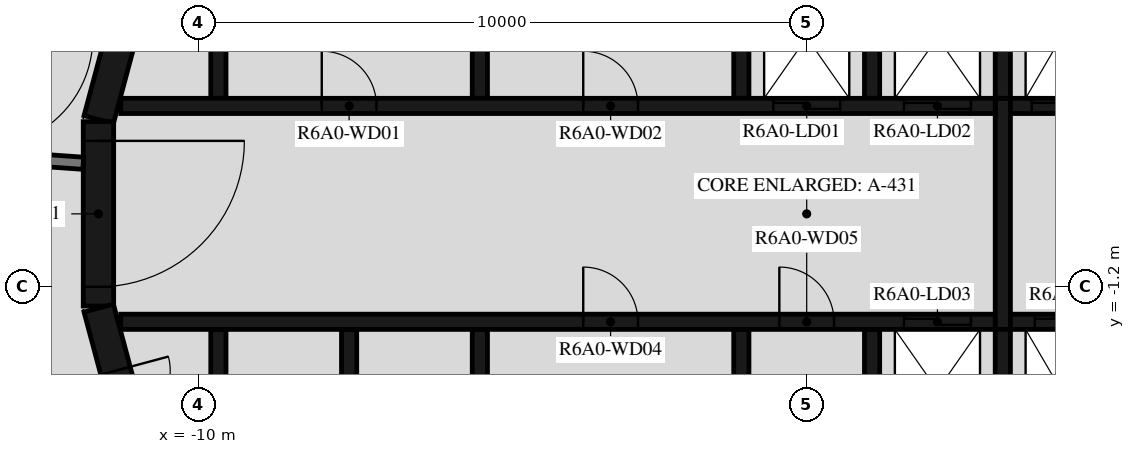
"""IFC4 building model, lengths in metres.
Left out: names, types, materials, properties, quantities, classifications, styles, units other than length and angle.
Written with IfcOpenShell. Run it as: python <this file> out.ifc"""

import sys

from ifc_helpers import new_model, si_unit, direction, frame, frame_2d, origin, place, context, subcontext, project, spatial, polyline, rectangle, outline, extrude, element, fill, save


model = new_model("IFC4")
c1 = context("Model", 3, precision=1e-05, world=origin(), true_north=direction((0.0, 1.0)))
c2 = subcontext(c1, "Body", "Model", "MODEL_VIEW")
j1 = project(units=[si_unit("LENGTHUNIT", "METRE"), si_unit("PLANEANGLEUNIT", "RADIAN")], contexts=[c1])
p1 = place(None, origin())
s1 = spatial("IfcSite", under=j1, at=p1, CompositionType="ELEMENT")
p2 = place(p1, origin())
s2 = spatial("IfcBuilding", under=s1, at=p2, CompositionType="ELEMENT")
p3 = place(p2, frame((0.0, 0.0, 226.7)))
s3 = spatial("IfcBuildingStorey", under=s2, at=p3, CompositionType="ELEMENT", Elevation=226.7)
p4 = place(p3, frame((-10.858, 4.479, 0.0), z_axis=(0.0, 0.0, 1.0), x_axis=(-0.258734743916, -0.965948410781, 0.0)))
e1 = element("IfcWall", 1, at=p4, inside=s3, PredefinedType="SHEAR", context=c2, shape_type="SweptSolid", body=[
    extrude(rectangle(XDim=3.033, YDim=0.5, at=frame_2d((1.516, 0.0))), origin(), (0.0, 0.0, 1.0), 3.12),
])
p5 = place(p3, frame((-11.647, 1.516, 0.0), z_axis=(0.0, 0.0, 1.0), x_axis=(0.0, -1.0, 0.0)))
e2 = element("IfcWall", 2, at=p5, inside=s3, PredefinedType="SHEAR", context=c2, shape_type="SweptSolid", body=[
    extrude(rectangle(XDim=3.033, YDim=0.5, at=frame_2d((1.516, 0.0))), origin(), (0.0, 0.0, 1.0), 3.12),
])
p6 = place(p5, frame((0.316, 0.0, 0.0)))
e3 = element("IfcOpeningElement", 3, at=p6, cuts=e2, PredefinedType="OPENING", context=c2, shape_type="SweptSolid", body=[
    extrude(rectangle(XDim=2.4, YDim=2.1, at=frame_2d((1.2, 1.05))), frame((0.0, 0.26, 0.0), z_axis=(0.0, -1.0, 0.0), x_axis=(1.0, 0.0, 0.0)), (0.0, 0.0, 1.0), 0.52),
])
p7 = place(p3, frame((-11.643, -1.55, 0.0), z_axis=(0.0, 0.0, 1.0), x_axis=(0.258734743916, -0.965948410781, 0.0)))
e4 = element("IfcWall", 4, at=p7, inside=s3, PredefinedType="SHEAR", context=c2, shape_type="SweptSolid", body=[
    extrude(rectangle(XDim=3.033, YDim=0.5, at=frame_2d((1.516, 0.0))), origin(), (0.0, 0.0, 1.0), 3.12),
])
p8 = place(p7, frame((1.066, 0.0, 0.0)))
e5 = element("IfcOpeningElement", 5, at=p8, cuts=e4, PredefinedType="OPENING", context=c2, shape_type="SweptSolid", body=[
    extrude(rectangle(XDim=0.9, YDim=2.1, at=frame_2d((0.45, 1.05))), frame((0.0, 0.26, 0.0), z_axis=(0.0, -1.0, 0.0), x_axis=(1.0, 0.0, 0.0)), (0.0, 0.0, 1.0), 0.52),
])
p9 = place(p3, origin())
e6 = element("IfcWall", 6, at=p9, inside=s3, PredefinedType="SHEAR", context=c2, shape_type="SweptSolid", body=[
    extrude(outline(polyline([(-9.55, 4.8), (-5.5, 4.8), (-5.5, 1.9), (-5.25, 1.9), (-5.25, 4.8), (-1.2, 4.8), (-1.2, 1.9), (-0.95, 1.9), (-0.95, 4.8), (0.95, 4.8), (0.95, 1.9), (1.2, 1.9), (1.2, 4.8), (3.1, 4.8), (3.1, 1.9), (3.35, 1.9), (3.35, 4.8), (5.25, 4.8), (5.25, 1.9), (5.5, 1.9), (5.5, 4.8), (7.4, 4.8), (7.4, 1.9), (7.65, 1.9), (7.65, 4.8), (9.55, 4.8), (9.55, 1.9), (9.8, 1.9), (9.8, 4.8), (9.8, 5.05), (-9.8, 5.05), (-9.8, 4.8), (-9.8, 1.9), (-9.55, 1.9), (-9.55, 4.8)])), origin(), (0.0, 0.0, 1.0), 3.12),
])
p10 = place(p3, origin())
e7 = element("IfcWall", 7, at=p10, inside=s3, PredefinedType="SHEAR", context=c2, shape_type="SweptSolid", body=[
    extrude(outline(polyline([(9.8, -5.05), (9.8, -4.8), (9.8, -1.9), (9.55, -1.9), (9.55, -4.8), (7.65, -4.8), (7.65, -1.9), (7.4, -1.9), (7.4, -4.8), (5.5, -4.8), (5.5, -1.9), (5.25, -1.9), (5.25, -4.8), (3.35, -4.8), (3.35, -1.9), (3.1, -1.9), (3.1, -4.8), (1.2, -4.8), (1.2, -1.9), (0.95, -1.9), (0.95, -4.8), (-0.95, -4.8), (-0.95, -1.9), (-1.2, -1.9), (-1.2, -4.8), (-5.25, -4.8), (-5.25, -1.9), (-5.5, -1.9), (-5.5, -4.8), (-7.4, -4.8), (-7.4, -1.9), (-7.65, -1.9), (-7.65, -4.8), (-9.55, -4.8), (-9.55, -1.9), (-9.8, -1.9), (-9.8, -4.8), (-9.8, -5.05), (9.8, -5.05)])), origin(), (0.0, 0.0, 1.0), 3.12),
])
p11 = place(p3, frame((-11.28, 1.775, 0.0), z_axis=(0.0, 0.0, 1.0), x_axis=(1.0, 0.0, 0.0)))
e8 = element("IfcWall", 8, at=p11, inside=s3, PredefinedType="SHEAR", context=c2, shape_type="SweptSolid", body=[
    extrude(rectangle(XDim=14.38, YDim=0.25, at=frame_2d((7.19, 0.0))), origin(), (0.0, 0.0, 1.0), 3.12),
])
p12 = place(p11, frame((10.73, 0.0, 0.0)))
e9 = element("IfcOpeningElement", 9, at=p12, cuts=e8, PredefinedType="OPENING", context=c2, shape_type="SweptSolid", body=[
    extrude(rectangle(XDim=1.1, YDim=2.1, at=frame_2d((0.55, 1.05))), frame((0.0, 0.135, 0.0), z_axis=(0.0, -1.0, 0.0), x_axis=(1.0, 0.0, 0.0)), (0.0, 0.0, 1.0), 0.27),
])
p13 = place(p11, frame((12.88, 0.0, 0.0)))
e10 = element("IfcOpeningElement", 10, at=p13, cuts=e8, PredefinedType="OPENING", context=c2, shape_type="SweptSolid", body=[
    extrude(rectangle(XDim=1.1, YDim=2.1, at=frame_2d((0.55, 1.05))), frame((0.0, 0.135, 0.0), z_axis=(0.0, -1.0, 0.0), x_axis=(1.0, 0.0, 0.0)), (0.0, 0.0, 1.0), 0.27),
])
p14 = place(p11, frame((3.305, 0.0, 0.0)))
e11 = element("IfcOpeningElement", 11, at=p14, cuts=e8, PredefinedType="OPENING", context=c2, shape_type="SweptSolid", body=[
    extrude(rectangle(XDim=0.9, YDim=2.1, at=frame_2d((0.45, 1.05))), frame((0.0, 0.135, 0.0), z_axis=(0.0, -1.0, 0.0), x_axis=(1.0, 0.0, 0.0)), (0.0, 0.0, 1.0), 0.27),
])
p15 = place(p11, frame((7.605, 0.0, 0.0)))
e12 = element("IfcOpeningElement", 12, at=p15, cuts=e8, PredefinedType="OPENING", context=c2, shape_type="SweptSolid", body=[
    extrude(rectangle(XDim=0.9, YDim=2.1, at=frame_2d((0.45, 1.05))), frame((0.0, 0.135, 0.0), z_axis=(0.0, -1.0, 0.0), x_axis=(1.0, 0.0, 0.0)), (0.0, 0.0, 1.0), 0.27),
])
p16 = place(p3, frame((3.35, 1.775, 0.0), z_axis=(0.0, 0.0, 1.0), x_axis=(1.0, 0.0, 0.0)))
e13 = element("IfcWall", 13, at=p16, inside=s3, PredefinedType="SHEAR", context=c2, shape_type="SweptSolid", body=[
    extrude(rectangle(XDim=7.93, YDim=0.25, at=frame_2d((3.965, 0.0))), origin(), (0.0, 0.0, 1.0), 3.12),
])
p17 = place(p16, frame((0.35, 0.0, 0.0)))
e14 = element("IfcOpeningElement", 14, at=p17, cuts=e13, PredefinedType="OPENING", context=c2, shape_type="SweptSolid", body=[
    extrude(rectangle(XDim=1.2, YDim=2.4, at=frame_2d((0.6, 1.2))), frame((0.0, 0.135, 0.0), z_axis=(0.0, -1.0, 0.0), x_axis=(1.0, 0.0, 0.0)), (0.0, 0.0, 1.0), 0.27),
])
p18 = place(p16, frame((2.5, 0.0, 0.0)))
e15 = element("IfcOpeningElement", 15, at=p18, cuts=e13, PredefinedType="OPENING", context=c2, shape_type="SweptSolid", body=[
    extrude(rectangle(XDim=1.2, YDim=2.4, at=frame_2d((0.6, 1.2))), frame((0.0, 0.135, 0.0), z_axis=(0.0, -1.0, 0.0), x_axis=(1.0, 0.0, 0.0)), (0.0, 0.0, 1.0), 0.27),
])
p19 = place(p16, frame((4.8, 0.0, 0.0)))
e16 = element("IfcOpeningElement", 16, at=p19, cuts=e13, PredefinedType="OPENING", context=c2, shape_type="SweptSolid", body=[
    extrude(rectangle(XDim=0.9, YDim=2.1, at=frame_2d((0.45, 1.05))), frame((0.0, 0.135, 0.0), z_axis=(0.0, -1.0, 0.0), x_axis=(1.0, 0.0, 0.0)), (0.0, 0.0, 1.0), 0.27),
])
p20 = place(p3, frame((-11.28, -1.775, 0.0), z_axis=(0.0, 0.0, 1.0), x_axis=(1.0, 0.0, 0.0)))
e17 = element("IfcWall", 17, at=p20, inside=s3, PredefinedType="SHEAR", context=c2, shape_type="SweptSolid", body=[
    extrude(rectangle(XDim=14.38, YDim=0.25, at=frame_2d((7.19, 0.0))), origin(), (0.0, 0.0, 1.0), 3.12),
])
p21 = place(p20, frame((12.88, 0.0, 0.0)))
e18 = element("IfcOpeningElement", 18, at=p21, cuts=e17, PredefinedType="OPENING", context=c2, shape_type="SweptSolid", body=[
    extrude(rectangle(XDim=1.1, YDim=2.1, at=frame_2d((0.55, 1.05))), frame((0.0, 0.135, 0.0), z_axis=(0.0, -1.0, 0.0), x_axis=(1.0, 0.0, 0.0)), (0.0, 0.0, 1.0), 0.27),
])
p22 = place(p20, frame((7.605, 0.0, 0.0)))
e19 = element("IfcOpeningElement", 19, at=p22, cuts=e17, PredefinedType="OPENING", context=c2, shape_type="SweptSolid", body=[
    extrude(rectangle(XDim=0.9, YDim=2.1, at=frame_2d((0.45, 1.05))), frame((0.0, 0.135, 0.0), z_axis=(0.0, -1.0, 0.0), x_axis=(1.0, 0.0, 0.0)), (0.0, 0.0, 1.0), 0.27),
])
p23 = place(p20, frame((10.83, 0.0, 0.0)))
e20 = element("IfcOpeningElement", 20, at=p23, cuts=e17, PredefinedType="OPENING", context=c2, shape_type="SweptSolid", body=[
    extrude(rectangle(XDim=0.9, YDim=2.1, at=frame_2d((0.45, 1.05))), frame((0.0, 0.135, 0.0), z_axis=(0.0, -1.0, 0.0), x_axis=(1.0, 0.0, 0.0)), (0.0, 0.0, 1.0), 0.27),
])
p24 = place(p3, frame((3.35, -1.775, 0.0), z_axis=(0.0, 0.0, 1.0), x_axis=(1.0, 0.0, 0.0)))
e21 = element("IfcWall", 21, at=p24, inside=s3, PredefinedType="SHEAR", context=c2, shape_type="SweptSolid", body=[
    extrude(rectangle(XDim=7.93, YDim=0.25, at=frame_2d((3.965, 0.0))), origin(), (0.0, 0.0, 1.0), 3.12),
])
p25 = place(p24, frame((0.4, 0.0, 0.0)))
e22 = element("IfcOpeningElement", 22, at=p25, cuts=e21, PredefinedType="OPENING", context=c2, shape_type="SweptSolid", body=[
    extrude(rectangle(XDim=1.1, YDim=2.4, at=frame_2d((0.55, 1.2))), frame((0.0, 0.135, 0.0), z_axis=(0.0, -1.0, 0.0), x_axis=(1.0, 0.0, 0.0)), (0.0, 0.0, 1.0), 0.27),
])
p26 = place(p24, frame((2.55, 0.0, 0.0)))
e23 = element("IfcOpeningElement", 23, at=p26, cuts=e21, PredefinedType="OPENING", context=c2, shape_type="SweptSolid", body=[
    extrude(rectangle(XDim=1.1, YDim=2.4, at=frame_2d((0.55, 1.2))), frame((0.0, 0.135, 0.0), z_axis=(0.0, -1.0, 0.0), x_axis=(1.0, 0.0, 0.0)), (0.0, 0.0, 1.0), 0.27),
])
p27 = place(p24, frame((4.7, 0.0, 0.0)))
e24 = element("IfcOpeningElement", 24, at=p27, cuts=e21, PredefinedType="OPENING", context=c2, shape_type="SweptSolid", body=[
    extrude(rectangle(XDim=1.1, YDim=2.4, at=frame_2d((0.55, 1.2))), frame((0.0, 0.135, 0.0), z_axis=(0.0, -1.0, 0.0), x_axis=(1.0, 0.0, 0.0)), (0.0, 0.0, 1.0), 0.27),
])
p28 = place(p3, frame((3.225, -1.9, 0.0), z_axis=(0.0, 0.0, 1.0), x_axis=(0.0, 1.0, 0.0)))
e25 = element("IfcWall", 25, at=p28, inside=s3, PredefinedType="SHEAR", context=c2, shape_type="SweptSolid", body=[
    extrude(rectangle(XDim=3.8, YDim=0.25, at=frame_2d((1.9, 0.0))), origin(), (0.0, 0.0, 1.0), 3.12),
])
p29 = place(p3, frame((-13.454, 0.941, 0.0), z_axis=(0.0, 0.0, 1.0), x_axis=(0.99755155062, -0.069934997354, 0.0)))
e26 = element("IfcWall", 26, at=p29, inside=s3, PredefinedType="STANDARD", context=c2, shape_type="SweptSolid", body=[
    extrude(rectangle(XDim=1.561, YDim=0.2, at=frame_2d((0.78, 0.0))), origin(), (0.0, 0.0, 1.0), 3.12),
])
p30 = place(p6, origin())
e27 = element("IfcDoor", 27, at=p30, inside=s3, OperationType="DOUBLE_DOOR_SINGLE_SWING", PredefinedType="DOOR", context=c2, shape_type="SweptSolid", body=[
    extrude(rectangle(XDim=2.4, YDim=2.1, at=frame_2d((1.2, 1.05))), frame((0.0, 0.025, 0.0), z_axis=(0.0, -1.0, 0.0), x_axis=(1.0, 0.0, 0.0)), (0.0, 0.0, 1.0), 0.05),
])
fill(e3, e27)
p31 = place(p12, origin())
e28 = element("IfcDoor", 28, at=p31, inside=s3, OperationType="DOUBLE_DOOR_SLIDING", PredefinedType="DOOR", context=c2, shape_type="SweptSolid", body=[
    extrude(rectangle(XDim=1.1, YDim=2.1, at=frame_2d((0.55, 1.05))), frame((0.0, 0.025, 0.0), z_axis=(0.0, -1.0, 0.0), x_axis=(1.0, 0.0, 0.0)), (0.0, 0.0, 1.0), 0.05),
])
fill(e9, e28)
p32 = place(p13, origin())
e29 = element("IfcDoor", 29, at=p32, inside=s3, OperationType="DOUBLE_DOOR_SLIDING", PredefinedType="DOOR", context=c2, shape_type="SweptSolid", body=[
    extrude(rectangle(XDim=1.1, YDim=2.1, at=frame_2d((0.55, 1.05))), frame((0.0, 0.025, 0.0), z_axis=(0.0, -1.0, 0.0), x_axis=(1.0, 0.0, 0.0)), (0.0, 0.0, 1.0), 0.05),
])
fill(e10, e29)
p33 = place(p17, origin())
e30 = element("IfcDoor", 30, at=p33, inside=s3, OperationType="DOUBLE_DOOR_SLIDING", PredefinedType="DOOR", context=c2, shape_type="SweptSolid", body=[
    extrude(rectangle(XDim=1.2, YDim=2.4, at=frame_2d((0.6, 1.2))), frame((0.0, 0.025, 0.0), z_axis=(0.0, -1.0, 0.0), x_axis=(1.0, 0.0, 0.0)), (0.0, 0.0, 1.0), 0.05),
])
fill(e14, e30)
p34 = place(p21, origin())
e31 = element("IfcDoor", 31, at=p34, inside=s3, OperationType="DOUBLE_DOOR_SLIDING", PredefinedType="DOOR", context=c2, shape_type="SweptSolid", body=[
    extrude(rectangle(XDim=1.1, YDim=2.1, at=frame_2d((0.55, 1.05))), frame((0.0, 0.025, 0.0), z_axis=(0.0, -1.0, 0.0), x_axis=(1.0, 0.0, 0.0)), (0.0, 0.0, 1.0), 0.05),
])
fill(e18, e31)
p35 = place(p25, origin())
e32 = element("IfcDoor", 32, at=p35, inside=s3, OperationType="DOUBLE_DOOR_SLIDING", PredefinedType="DOOR", context=c2, shape_type="SweptSolid", body=[
    extrude(rectangle(XDim=1.1, YDim=2.4, at=frame_2d((0.55, 1.2))), frame((0.0, 0.025, 0.0), z_axis=(0.0, -1.0, 0.0), x_axis=(1.0, 0.0, 0.0)), (0.0, 0.0, 1.0), 0.05),
])
fill(e22, e32)
p36 = place(p14, origin())
e33 = element("IfcDoor", 33, at=p36, inside=s3, OperationType="SINGLE_SWING_LEFT", PredefinedType="DOOR", context=c2, shape_type="SweptSolid", body=[
    extrude(rectangle(XDim=0.9, YDim=2.1, at=frame_2d((0.45, 1.05))), frame((0.0, 0.025, 0.0), z_axis=(0.0, -1.0, 0.0), x_axis=(1.0, 0.0, 0.0)), (0.0, 0.0, 1.0), 0.05),
])
fill(e11, e33)
p37 = place(p15, origin())
e34 = element("IfcDoor", 34, at=p37, inside=s3, OperationType="SINGLE_SWING_RIGHT", PredefinedType="DOOR", context=c2, shape_type="SweptSolid", body=[
    extrude(rectangle(XDim=0.9, YDim=2.1, at=frame_2d((0.45, 1.05))), frame((0.0, 0.025, 0.0), z_axis=(0.0, -1.0, 0.0), x_axis=(1.0, 0.0, 0.0)), (0.0, 0.0, 1.0), 0.05),
])
fill(e12, e34)
p38 = place(p22, origin())
e35 = element("IfcDoor", 35, at=p38, inside=s3, OperationType="SINGLE_SWING_RIGHT", PredefinedType="DOOR", context=c2, shape_type="SweptSolid", body=[
    extrude(rectangle(XDim=0.9, YDim=2.1, at=frame_2d((0.45, 1.05))), frame((0.0, 0.025, 0.0), z_axis=(0.0, -1.0, 0.0), x_axis=(1.0, 0.0, 0.0)), (0.0, 0.0, 1.0), 0.05),
])
fill(e19, e35)
p39 = place(p23, origin())
e36 = element("IfcDoor", 36, at=p39, inside=s3, OperationType="SINGLE_SWING_LEFT", PredefinedType="DOOR", context=c2, shape_type="SweptSolid", body=[
    extrude(rectangle(XDim=0.9, YDim=2.1, at=frame_2d((0.45, 1.05))), frame((0.0, 0.025, 0.0), z_axis=(0.0, -1.0, 0.0), x_axis=(1.0, 0.0, 0.0)), (0.0, 0.0, 1.0), 0.05),
])
fill(e20, e36)
p40 = place(p8, origin())
e37 = element("IfcDoor", 37, at=p40, inside=s3, OperationType="SINGLE_SWING_RIGHT", PredefinedType="DOOR", context=c2, shape_type="SweptSolid", body=[
    extrude(rectangle(XDim=0.9, YDim=2.1, at=frame_2d((0.45, 1.05))), frame((0.0, 0.025, 0.0), z_axis=(0.0, -1.0, 0.0), x_axis=(1.0, 0.0, 0.0)), (0.0, 0.0, 1.0), 0.05),
])
fill(e5, e37)
save(model, sys.argv[1])
